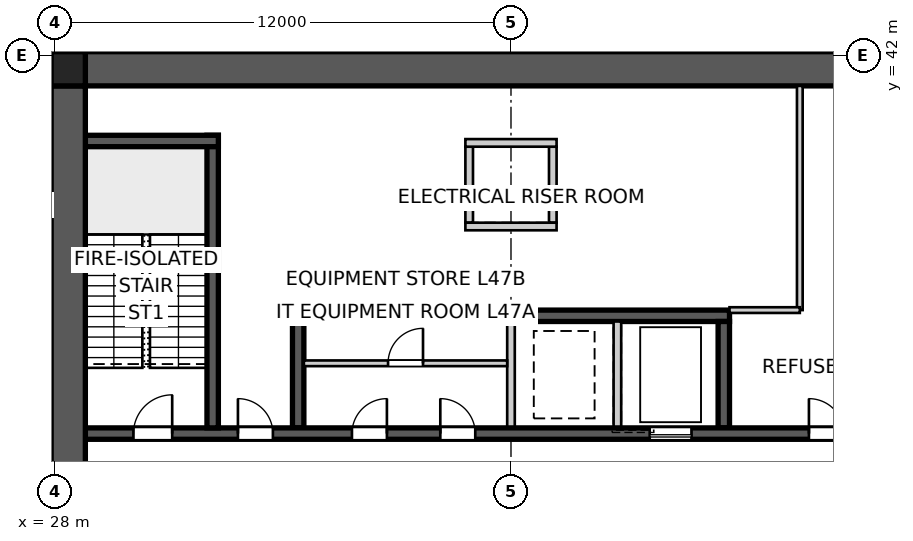
"""IFC4 building model, lengths in metres.
Left out: names, types, materials, properties, quantities, classifications, styles, units other than length and angle.
Written with IfcOpenShell. Run it as: python <this file> out.ifc"""

import sys

from ifc_helpers import new_model, si_unit, direction, frame, frame_2d, origin, origin_2d, place, context, subcontext, project, spatial, polyline, rectangle, outline, extrude, element, fill, save


model = new_model("IFC4")
c1 = context("Model", 3, precision=1e-05, world=origin(), true_north=direction((0.0, 1.0)))
c2 = subcontext(c1, "Body", "Model", "MODEL_VIEW")
j1 = project(units=[si_unit("LENGTHUNIT", "METRE"), si_unit("PLANEANGLEUNIT", "RADIAN")], contexts=[c1])
p1 = place(None, origin())
s1 = spatial("IfcSite", under=j1, at=p1, CompositionType="ELEMENT")
p2 = place(p1, origin())
s2 = spatial("IfcBuilding", under=s1, at=p2, CompositionType="ELEMENT")
p3 = place(p2, frame((0.0, 0.0, 171.0)))
s3 = spatial("IfcBuildingStorey", under=s2, at=p3, CompositionType="ELEMENT", Elevation=171.0)
p4 = place(p3, frame((28.8, 41.65, 0.0), z_axis=(0.0, 0.0, 1.0), x_axis=(1.0, 0.0, 0.0)))
e1 = element("IfcWall", 1, at=p4, inside=s3, PredefinedType="SHEAR", context=c2, shape_type="SweptSolid", body=[
    extrude(outline(polyline([(0.0, -0.45), (22.4, -0.45), (22.4, -0.025), (22.85, -0.025), (22.85, 0.025), (22.4, 0.025), (22.4, 0.45), (0.0, 0.45), (0.0, 0.025), (-0.45, 0.025), (-0.45, -0.025), (0.0, -0.025), (0.0, -0.45)])), origin(), (0.0, 0.0, 1.0), 5.0),
])
p5 = place(p3, frame((28.35, 41.2, 0.0), z_axis=(0.0, 0.0, 1.0), x_axis=(0.0, -1.0, 0.0)))
e2 = element("IfcWall", 2, at=p5, inside=s3, PredefinedType="SHEAR", context=c2, shape_type="SweptSolid", body=[
    extrude(outline(polyline([(0.0, -0.45), (22.4, -0.45), (22.4, -0.025), (22.85, -0.025), (22.85, 0.025), (22.4, 0.025), (22.4, 0.45), (0.0, 0.45), (0.0, 0.025), (-0.45, 0.025), (-0.45, -0.025), (0.0, -0.025), (0.0, -0.45)])), origin(), (0.0, 0.0, 1.0), 5.0),
])
p6 = place(p5, frame((11.14, 0.0, 0.0)))
e3 = element("IfcOpeningElement", 3, at=p6, cuts=e2, PredefinedType="OPENING", context=c2, shape_type="SweptSolid", body=[
    extrude(rectangle(XDim=1.02, YDim=2.4, at=frame_2d((0.51, 1.2))), frame((0.0, 0.46, 0.0), z_axis=(0.0, -1.0, 0.0), x_axis=(1.0, 0.0, 0.0)), (0.0, 0.0, 1.0), 0.92),
])
p7 = place(p3, frame((28.8, 32.05, 0.0), z_axis=(0.0, 0.0, 1.0), x_axis=(1.0, 0.0, 0.0)))
e4 = element("IfcWall", 4, at=p7, inside=s3, PredefinedType="SHEAR", context=c2, shape_type="SweptSolid", body=[
    extrude(rectangle(XDim=22.4, YDim=0.3, at=frame_2d((11.2, 0.0))), origin(), (0.0, 0.0, 1.0), 5.0),
])
p8 = place(p7, frame((19.04, 0.0, 0.0)))
e5 = element("IfcOpeningElement", 5, at=p8, cuts=e4, PredefinedType="OPENING", context=c2, shape_type="SweptSolid", body=[
    extrude(rectangle(XDim=0.92, YDim=2.1, at=frame_2d((0.46, 1.05))), frame((0.0, 0.16, 0.0), z_axis=(0.0, -1.0, 0.0), x_axis=(1.0, 0.0, 0.0)), (0.0, 0.0, 1.0), 0.32),
])
p9 = place(p7, frame((1.265, 0.0, 0.0)))
e6 = element("IfcOpeningElement", 6, at=p9, cuts=e4, PredefinedType="OPENING", context=c2, shape_type="SweptSolid", body=[
    extrude(rectangle(XDim=1.02, YDim=2.1, at=frame_2d((0.51, 1.05))), frame((0.0, 0.16, 0.0), z_axis=(0.0, -1.0, 0.0), x_axis=(1.0, 0.0, 0.0)), (0.0, 0.0, 1.0), 0.32),
])
p10 = place(p7, frame((4.015, 0.0, 0.0)))
e7 = element("IfcOpeningElement", 7, at=p10, cuts=e4, PredefinedType="OPENING", context=c2, shape_type="SweptSolid", body=[
    extrude(rectangle(XDim=0.92, YDim=2.1, at=frame_2d((0.46, 1.05))), frame((0.0, 0.16, 0.0), z_axis=(0.0, -1.0, 0.0), x_axis=(1.0, 0.0, 0.0)), (0.0, 0.0, 1.0), 0.32),
])
p11 = place(p7, frame((7.015, 0.0, 0.0)))
e8 = element("IfcOpeningElement", 8, at=p11, cuts=e4, PredefinedType="OPENING", context=c2, shape_type="SweptSolid", body=[
    extrude(rectangle(XDim=0.92, YDim=2.1, at=frame_2d((0.46, 1.05))), frame((0.0, 0.16, 0.0), z_axis=(0.0, -1.0, 0.0), x_axis=(1.0, 0.0, 0.0)), (0.0, 0.0, 1.0), 0.32),
])
p12 = place(p7, frame((9.34, 0.0, 0.0)))
e9 = element("IfcOpeningElement", 9, at=p12, cuts=e4, PredefinedType="OPENING", context=c2, shape_type="SweptSolid", body=[
    extrude(rectangle(XDim=0.92, YDim=2.1, at=frame_2d((0.46, 1.05))), frame((0.0, 0.16, 0.0), z_axis=(0.0, -1.0, 0.0), x_axis=(1.0, 0.0, 0.0)), (0.0, 0.0, 1.0), 0.32),
])
p13 = place(p7, frame((14.85, 0.0, 0.0)))
e10 = element("IfcOpeningElement", 10, at=p13, cuts=e4, PredefinedType="OPENING", context=c2, shape_type="SweptSolid", body=[
    extrude(rectangle(XDim=1.1, YDim=2.1, at=frame_2d((0.55, 1.05))), frame((0.0, 0.16, 0.0), z_axis=(0.0, -1.0, 0.0), x_axis=(1.0, 0.0, 0.0)), (0.0, 0.0, 1.0), 0.32),
])
p14 = place(p3, frame((34.25, 35.15, 0.0), z_axis=(0.0, 0.0, 1.0), x_axis=(1.0, 0.0, 0.0)))
e11 = element("IfcWall", 11, at=p14, inside=s3, PredefinedType="SHEAR", context=c2, shape_type="SweptSolid", body=[
    extrude(rectangle(XDim=11.5, YDim=0.3, at=frame_2d((5.75, 0.0))), origin(), (0.0, 0.0, 1.0), 5.0),
])
p15 = place(p3, frame((34.4, 32.2, 0.0), z_axis=(0.0, 0.0, 1.0), x_axis=(0.0, 1.0, 0.0)))
e12 = element("IfcWall", 12, at=p15, inside=s3, PredefinedType="SHEAR", context=c2, shape_type="SweptSolid", body=[
    extrude(rectangle(XDim=2.8, YDim=0.3, at=frame_2d((1.4, 0.0))), origin(), (0.0, 0.0, 1.0), 5.0),
])
for number, where, z_axis, x_axis in (
    (13, (40.0, 32.2, 0.0), (0.0, 0.0, 1.0), (0.0, 1.0, 0.0)),
    (14, (42.8, 32.2, 0.0), (0.0, 0.0, 1.0), (0.0, 1.0, 0.0)),
):
    element("IfcWall", number, at=place(p3, frame(where, z_axis=z_axis, x_axis=x_axis)), inside=s3, PredefinedType="SOLIDWALL", context=c2, shape_type="SweptSolid", body=[
        extrude(rectangle(XDim=2.8, YDim=0.2, at=frame_2d((1.4, 0.0))), origin(), (0.0, 0.0, 1.0), 5.0),
    ])
p16 = place(p3, frame((45.6, 32.2, 0.0), z_axis=(0.0, 0.0, 1.0), x_axis=(0.0, 1.0, 0.0)))
e15 = element("IfcWall", 15, at=p16, inside=s3, PredefinedType="SHEAR", context=c2, shape_type="SweptSolid", body=[
    extrude(rectangle(XDim=2.8, YDim=0.3, at=frame_2d((1.4, 0.0))), origin(), (0.0, 0.0, 1.0), 5.0),
])
p17 = place(p3, frame((32.15, 32.2, 0.0), z_axis=(0.0, 0.0, 1.0), x_axis=(0.0, 1.0, 0.0)))
e16 = element("IfcWall", 16, at=p17, inside=s3, PredefinedType="SHEAR", context=c2, shape_type="SweptSolid", body=[
    extrude(rectangle(XDim=7.7, YDim=0.3, at=frame_2d((3.85, 0.0))), origin(), (0.0, 0.0, 1.0), 5.0),
])
p18 = place(p3, frame((28.8, 39.75, 0.0), z_axis=(0.0, 0.0, 1.0), x_axis=(1.0, 0.0, 0.0)))
e17 = element("IfcWall", 17, at=p18, inside=s3, PredefinedType="SHEAR", context=c2, shape_type="SweptSolid", body=[
    extrude(rectangle(XDim=3.5, YDim=0.3, at=frame_2d((1.75, 0.0))), origin(), (0.0, 0.0, 1.0), 5.0),
])
for number, where, z_axis, x_axis in (
    (18, (38.9, 37.6, 0.0), (0.0, 0.0, 1.0), (0.0, 1.0, 0.0)),
    (19, (41.1, 37.6, 0.0), (0.0, 0.0, 1.0), (0.0, 1.0, 0.0)),
):
    element("IfcWall", number, at=place(p3, frame(where, z_axis=z_axis, x_axis=x_axis)), inside=s3, PredefinedType="SOLIDWALL", context=c2, shape_type="SweptSolid", body=[
        extrude(rectangle(XDim=2.0, YDim=0.2, at=frame_2d((1.0, 0.0))), origin(), (0.0, 0.0, 1.0), 5.0),
    ])
for number, where, z_axis, x_axis in (
    (20, (38.8, 37.5, 0.0), (0.0, 0.0, 1.0), (1.0, 0.0, 0.0)),
    (21, (38.8, 39.7, 0.0), (0.0, 0.0, 1.0), (1.0, 0.0, 0.0)),
):
    element("IfcWall", number, at=place(p3, frame(where, z_axis=z_axis, x_axis=x_axis)), inside=s3, PredefinedType="SOLIDWALL", context=c2, shape_type="SweptSolid", body=[
        extrude(rectangle(XDim=2.4, YDim=0.2, at=frame_2d((1.2, 0.0))), origin(), (0.0, 0.0, 1.0), 5.0),
    ])
p19 = place(p3, frame((28.35, 41.65, 0.0), z_axis=(0.0, 0.0, 1.0), x_axis=(1.0, 0.0, 0.0)))
e22 = element("IfcColumn", 22, at=p19, inside=s3, PredefinedType="COLUMN", context=c2, shape_type="SweptSolid", body=[
    extrude(rectangle(XDim=0.9, YDim=0.9, at=origin_2d()), origin(), (0.0, 0.0, 1.0), 5.0),
])
p20 = place(p3, frame((47.6, 41.2, 0.0), z_axis=(0.0, 0.0, 1.0), x_axis=(0.0, -1.0, 0.0)))
e23 = element("IfcWall", 23, at=p20, inside=s3, PredefinedType="SOLIDWALL", context=c2, shape_type="SweptSolid", body=[
    extrude(rectangle(XDim=5.9, YDim=0.15, at=frame_2d((2.95, 0.0))), origin(), (0.0, 0.0, 1.0), 4.85),
])
p21 = place(p3, frame((47.6, 35.3, 0.0), z_axis=(0.0, 0.0, 1.0), x_axis=(-1.0, 0.0, 0.0)))
e24 = element("IfcWall", 24, at=p21, inside=s3, PredefinedType="SOLIDWALL", context=c2, shape_type="SweptSolid", body=[
    extrude(rectangle(XDim=1.85, YDim=0.15, at=frame_2d((0.925, 0.0))), origin(), (0.0, 0.0, 1.0), 4.85),
])
p22 = place(p3, frame((34.55, 33.9, 0.0), z_axis=(0.0, 0.0, 1.0), x_axis=(1.0, 0.0, 0.0)))
e25 = element("IfcWall", 25, at=p22, inside=s3, PredefinedType="SOLIDWALL", context=c2, shape_type="SweptSolid", body=[
    extrude(rectangle(XDim=5.35, YDim=0.15, at=frame_2d((2.675, 0.0))), origin(), (0.0, 0.0, 1.0), 4.85),
])
p23 = place(p22, frame((2.215, 0.0, 0.0)))
e26 = element("IfcOpeningElement", 26, at=p23, cuts=e25, PredefinedType="OPENING", context=c2, shape_type="SweptSolid", body=[
    extrude(rectangle(XDim=0.92, YDim=2.1, at=frame_2d((0.46, 1.05))), frame((0.0, 0.085, 0.0), z_axis=(0.0, -1.0, 0.0), x_axis=(1.0, 0.0, 0.0)), (0.0, 0.0, 1.0), 0.17),
])
p24 = place(p8, origin())
e27 = element("IfcDoor", 27, at=p24, inside=s3, OperationType="SINGLE_SWING_LEFT", PredefinedType="DOOR", context=c2, shape_type="SweptSolid", body=[
    extrude(rectangle(XDim=0.92, YDim=2.1, at=frame_2d((0.46, 1.05))), frame((0.0, 0.025, 0.0), z_axis=(0.0, -1.0, 0.0), x_axis=(1.0, 0.0, 0.0)), (0.0, 0.0, 1.0), 0.05),
])
fill(e5, e27)
p25 = place(p9, origin())
e28 = element("IfcDoor", 28, at=p25, inside=s3, OperationType="SINGLE_SWING_RIGHT", PredefinedType="DOOR", context=c2, shape_type="SweptSolid", body=[
    extrude(rectangle(XDim=1.02, YDim=2.1, at=frame_2d((0.51, 1.05))), frame((0.0, 0.025, 0.0), z_axis=(0.0, -1.0, 0.0), x_axis=(1.0, 0.0, 0.0)), (0.0, 0.0, 1.0), 0.05),
])
fill(e6, e28)
p26 = place(p10, origin())
e29 = element("IfcDoor", 29, at=p26, inside=s3, OperationType="SINGLE_SWING_LEFT", PredefinedType="DOOR", context=c2, shape_type="SweptSolid", body=[
    extrude(rectangle(XDim=0.92, YDim=2.1, at=frame_2d((0.46, 1.05))), frame((0.0, 0.025, 0.0), z_axis=(0.0, -1.0, 0.0), x_axis=(1.0, 0.0, 0.0)), (0.0, 0.0, 1.0), 0.05),
])
fill(e7, e29)
p27 = place(p11, origin())
e30 = element("IfcDoor", 30, at=p27, inside=s3, OperationType="SINGLE_SWING_RIGHT", PredefinedType="DOOR", context=c2, shape_type="SweptSolid", body=[
    extrude(rectangle(XDim=0.92, YDim=2.1, at=frame_2d((0.46, 1.05))), frame((0.0, 0.025, 0.0), z_axis=(0.0, -1.0, 0.0), x_axis=(1.0, 0.0, 0.0)), (0.0, 0.0, 1.0), 0.05),
])
fill(e8, e30)
p28 = place(p12, origin())
e31 = element("IfcDoor", 31, at=p28, inside=s3, OperationType="SINGLE_SWING_LEFT", PredefinedType="DOOR", context=c2, shape_type="SweptSolid", body=[
    extrude(rectangle(XDim=0.92, YDim=2.1, at=frame_2d((0.46, 1.05))), frame((0.0, 0.025, 0.0), z_axis=(0.0, -1.0, 0.0), x_axis=(1.0, 0.0, 0.0)), (0.0, 0.0, 1.0), 0.05),
])
fill(e9, e31)
p29 = place(p23, origin())
e32 = element("IfcDoor", 32, at=p29, inside=s3, OperationType="SINGLE_SWING_RIGHT", PredefinedType="DOOR", context=c2, shape_type="SweptSolid", body=[
    extrude(rectangle(XDim=0.92, YDim=2.1, at=frame_2d((0.46, 1.05))), frame((0.0, 0.025, 0.0), z_axis=(0.0, -1.0, 0.0), x_axis=(1.0, 0.0, 0.0)), (0.0, 0.0, 1.0), 0.05),
])
fill(e26, e32)
p30 = place(p13, origin())
e33 = element("IfcDoor", 33, at=p30, inside=s3, OperationType="SLIDING_TO_LEFT", PredefinedType="DOOR", context=c2, shape_type="SweptSolid", body=[
    extrude(rectangle(XDim=1.1, YDim=2.1, at=frame_2d((0.55, 1.05))), frame((0.0, 0.025, 0.0), z_axis=(0.0, -1.0, 0.0), x_axis=(1.0, 0.0, 0.0)), (0.0, 0.0, 1.0), 0.05),
])
fill(e10, e33)
save(model, sys.argv[1])
